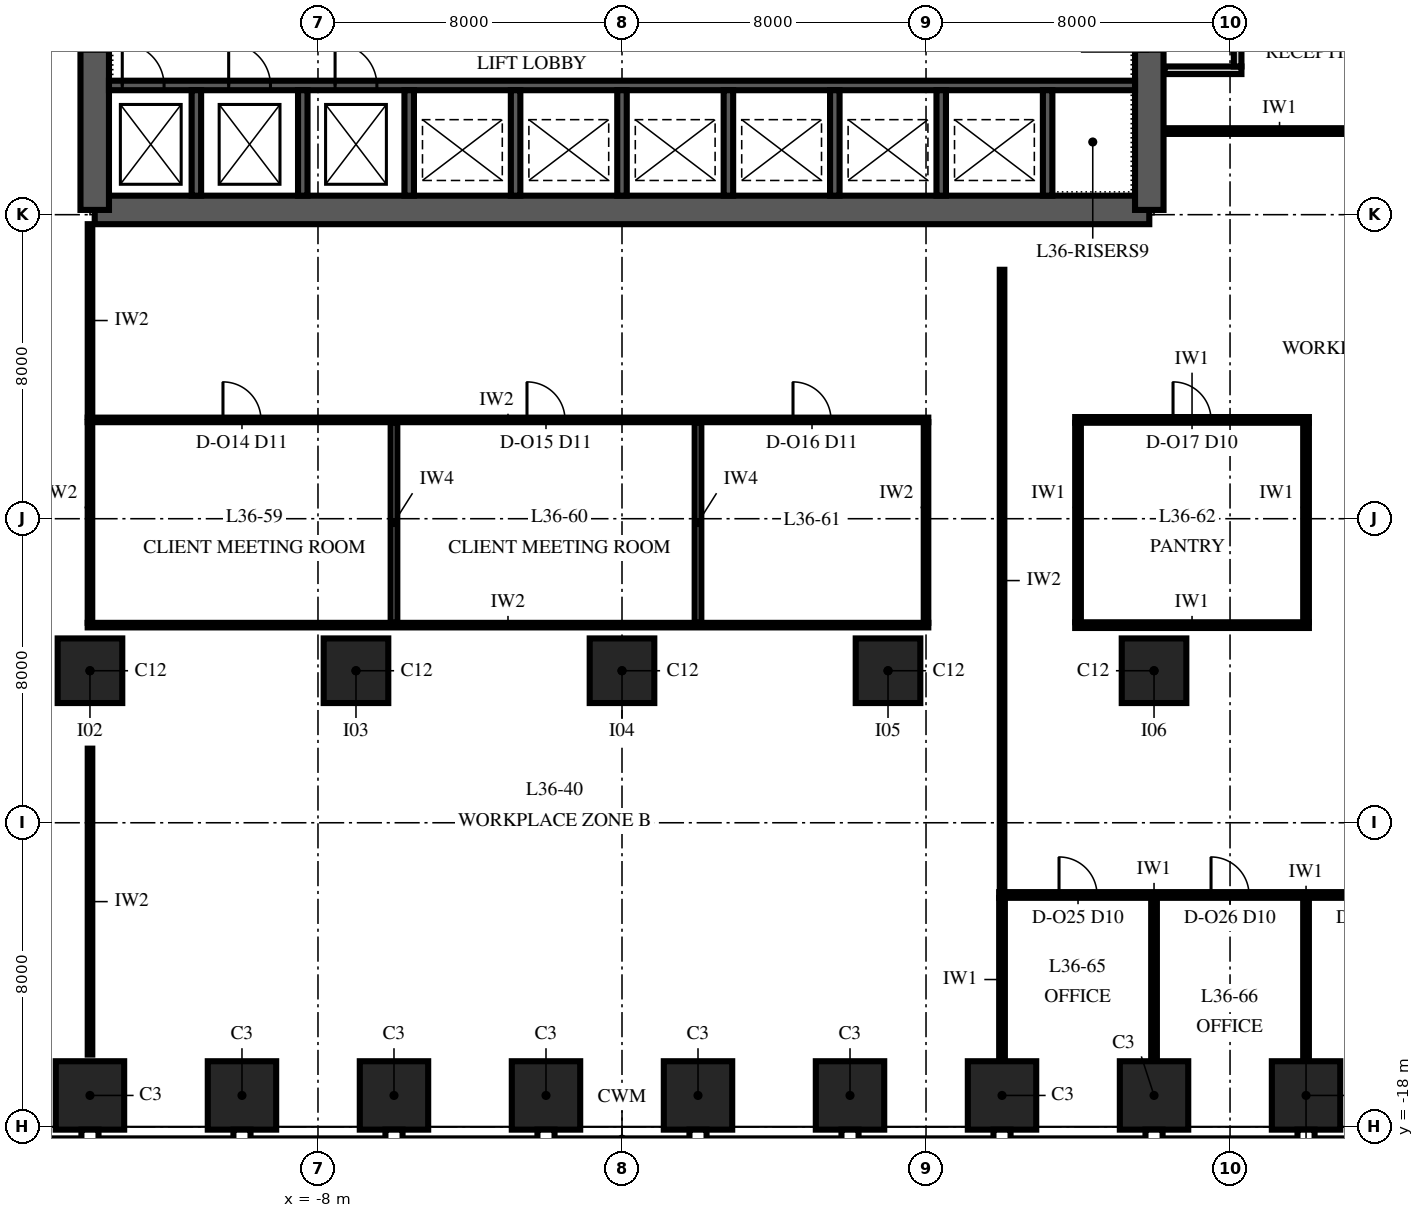
"""IFC4 building model, lengths in metres.
Left out: names, types, materials, properties, quantities, classifications, styles, units other than length and angle.
Written with IfcOpenShell. Run it as: python <this file> out.ifc"""

import sys

from ifc_helpers import new_model, si_unit, direction, frame, frame_2d, origin, origin_2d, place, context, subcontext, project, spatial, polyline, rectangle, outline, extrude, element, fill, save


model = new_model("IFC4")
c1 = context("Model", 3, precision=1e-05, world=origin(), true_north=direction((0.0, 1.0)))
c2 = subcontext(c1, "Body", "Model", "MODEL_VIEW")
j1 = project(units=[si_unit("LENGTHUNIT", "METRE"), si_unit("PLANEANGLEUNIT", "RADIAN")], contexts=[c1])
p1 = place(None, origin())
s1 = spatial("IfcSite", under=j1, at=p1, CompositionType="ELEMENT")
p2 = place(p1, origin())
s2 = spatial("IfcBuilding", under=s1, at=p2, CompositionType="ELEMENT")
p3 = place(p2, frame((0.0, 0.0, 159.0)))
s3 = spatial("IfcBuildingStorey", under=s2, at=p3, CompositionType="ELEMENT", Elevation=159.0)
for number, where, z_axis, x_axis in (
    (1, (-14.0, -17.175, 0.0), (0.0, 0.0, 1.0), (1.0, 0.0, 0.0)),
    (2, (-10.0, -17.175, 0.0), (0.0, 0.0, 1.0), (1.0, 0.0, 0.0)),
    (3, (-6.0, -17.175, 0.0), (0.0, 0.0, 1.0), (1.0, 0.0, 0.0)),
    (4, (-2.0, -17.175, 0.0), (0.0, 0.0, 1.0), (1.0, 0.0, 0.0)),
    (5, (2.0, -17.175, 0.0), (0.0, 0.0, 1.0), (1.0, 0.0, 0.0)),
    (6, (6.0, -17.175, 0.0), (0.0, 0.0, 1.0), (1.0, 0.0, 0.0)),
    (7, (10.0, -17.175, 0.0), (0.0, 0.0, 1.0), (1.0, 0.0, 0.0)),
    (8, (14.0, -17.175, 0.0), (0.0, 0.0, 1.0), (1.0, 0.0, 0.0)),
    (9, (18.0, -17.175, 0.0), (0.0, 0.0, 1.0), (1.0, 0.0, 0.0)),
):
    element("IfcColumn", number, at=place(p3, frame(where, z_axis=z_axis, x_axis=x_axis)), inside=s3, PredefinedType="COLUMN", context=c2, shape_type="SweptSolid", body=[
        extrude(rectangle(XDim=1.8, YDim=1.8, at=origin_2d()), origin(), (0.0, 0.0, 1.0), 4.0),
    ])
for number, where, z_axis, x_axis in (
    (10, (-14.0, -6.0, 0.0), (0.0, 0.0, 1.0), (1.0, 0.0, 0.0)),
    (11, (-7.0, -6.0, 0.0), (0.0, 0.0, 1.0), (1.0, 0.0, 0.0)),
    (12, (0.0, -6.0, 0.0), (0.0, 0.0, 1.0), (1.0, 0.0, 0.0)),
    (13, (7.0, -6.0, 0.0), (0.0, 0.0, 1.0), (1.0, 0.0, 0.0)),
    (14, (14.0, -6.0, 0.0), (0.0, 0.0, 1.0), (1.0, 0.0, 0.0)),
):
    element("IfcColumn", number, at=place(p3, frame(where, z_axis=z_axis, x_axis=x_axis)), inside=s3, PredefinedType="COLUMN", context=c2, shape_type="SweptSolid", body=[
        extrude(rectangle(XDim=1.7, YDim=1.7, at=origin_2d()), origin(), (0.0, 0.0, 1.0), 4.0),
    ])
p4 = place(p3, frame((-13.875, 6.125, 0.0), z_axis=(0.0, 0.0, 1.0), x_axis=(1.0, 0.0, 0.0)))
e15 = element("IfcWall", 15, at=p4, inside=s3, PredefinedType="SHEAR", context=c2, shape_type="SweptSolid", body=[
    extrude(rectangle(XDim=27.75, YDim=0.75, at=frame_2d((13.875, 0.0))), origin(), (0.0, 0.0, 1.0), 4.0),
])
p5 = place(p3, frame((13.875, 6.125, 0.0), z_axis=(0.0, 0.0, 1.0), x_axis=(0.0, 1.0, 0.0)))
e16 = element("IfcWall", 16, at=p5, inside=s3, PredefinedType="SHEAR", context=c2, shape_type="SweptSolid", body=[
    extrude(outline(polyline([(0.0, -0.375), (17.75, -0.375), (17.75, 0.0), (17.375, 0.0), (17.375, 0.375), (0.375, 0.375), (0.375, 0.0), (0.0, 0.0), (0.0, -0.375)])), origin(), (0.0, 0.0, 1.0), 4.0),
])
p6 = place(p5, frame((4.175, 0.0, 0.0)))
e17 = element("IfcOpeningElement", 17, at=p6, cuts=e16, PredefinedType="OPENING", context=c2, shape_type="SweptSolid", body=[
    extrude(rectangle(XDim=1.8, YDim=2.4, at=frame_2d((0.9, 1.2))), frame((0.0, 0.39, 0.0), z_axis=(0.0, -1.0, 0.0), x_axis=(1.0, 0.0, 0.0)), (0.0, 0.0, 1.0), 0.78),
])
p7 = place(p3, frame((-13.875, 23.875, 0.0), z_axis=(0.0, 0.0, 1.0), x_axis=(0.0, -1.0, 0.0)))
e18 = element("IfcWall", 18, at=p7, inside=s3, PredefinedType="SHEAR", context=c2, shape_type="SweptSolid", body=[
    extrude(outline(polyline([(0.0, -0.375), (17.75, -0.375), (17.75, 0.0), (17.375, 0.0), (17.375, 0.375), (0.375, 0.375), (0.375, 0.0), (0.0, 0.0), (0.0, -0.375)])), origin(), (0.0, 0.0, 1.0), 4.0),
])
p8 = place(p7, frame((11.775, 0.0, 0.0)))
e19 = element("IfcOpeningElement", 19, at=p8, cuts=e18, PredefinedType="OPENING", context=c2, shape_type="SweptSolid", body=[
    extrude(rectangle(XDim=1.8, YDim=2.4, at=frame_2d((0.9, 1.2))), frame((0.0, 0.39, 0.0), z_axis=(0.0, -1.0, 0.0), x_axis=(1.0, 0.0, 0.0)), (0.0, 0.0, 1.0), 0.78),
])
p9 = place(p3, frame((-13.5, 9.4, 0.0), z_axis=(0.0, 0.0, 1.0), x_axis=(1.0, 0.0, 0.0)))
e20 = element("IfcWall", 20, at=p9, inside=s3, PredefinedType="SHEAR", context=c2, shape_type="SweptSolid", body=[
    extrude(rectangle(XDim=27.0, YDim=0.25, at=frame_2d((13.5, 0.0))), origin(), (0.0, 0.0, 1.0), 4.0),
])
p10 = place(p9, frame((0.35, 0.0, 0.0)))
e21 = element("IfcOpeningElement", 21, at=p10, cuts=e20, PredefinedType="OPENING", context=c2, shape_type="SweptSolid", body=[
    extrude(rectangle(XDim=1.1, YDim=2.1, at=frame_2d((0.55, 1.05))), frame((0.0, 0.14, 0.0), z_axis=(0.0, -1.0, 0.0), x_axis=(1.0, 0.0, 0.0)), (0.0, 0.0, 1.0), 0.28),
])
p11 = place(p9, frame((3.15, 0.0, 0.0)))
e22 = element("IfcOpeningElement", 22, at=p11, cuts=e20, PredefinedType="OPENING", context=c2, shape_type="SweptSolid", body=[
    extrude(rectangle(XDim=1.1, YDim=2.1, at=frame_2d((0.55, 1.05))), frame((0.0, 0.14, 0.0), z_axis=(0.0, -1.0, 0.0), x_axis=(1.0, 0.0, 0.0)), (0.0, 0.0, 1.0), 0.28),
])
p12 = place(p9, frame((5.95, 0.0, 0.0)))
e23 = element("IfcOpeningElement", 23, at=p12, cuts=e20, PredefinedType="OPENING", context=c2, shape_type="SweptSolid", body=[
    extrude(rectangle(XDim=1.1, YDim=2.1, at=frame_2d((0.55, 1.05))), frame((0.0, 0.14, 0.0), z_axis=(0.0, -1.0, 0.0), x_axis=(1.0, 0.0, 0.0)), (0.0, 0.0, 1.0), 0.28),
])
for number, where, z_axis, x_axis in (
    (24, (-11.2, 6.5, 0.0), (0.0, 0.0, 1.0), (0.0, 1.0, 0.0)),
    (25, (-8.4, 6.5, 0.0), (0.0, 0.0, 1.0), (0.0, 1.0, 0.0)),
    (26, (-5.6, 6.5, 0.0), (0.0, 0.0, 1.0), (0.0, 1.0, 0.0)),
    (27, (-2.8, 6.5, 0.0), (0.0, 0.0, 1.0), (0.0, 1.0, 0.0)),
    (28, (0.0, 6.5, 0.0), (0.0, 0.0, 1.0), (0.0, 1.0, 0.0)),
    (29, (2.8, 6.5, 0.0), (0.0, 0.0, 1.0), (0.0, 1.0, 0.0)),
    (30, (5.6, 6.5, 0.0), (0.0, 0.0, 1.0), (0.0, 1.0, 0.0)),
    (31, (8.4, 6.5, 0.0), (0.0, 0.0, 1.0), (0.0, 1.0, 0.0)),
    (32, (11.2, 6.5, 0.0), (0.0, 0.0, 1.0), (0.0, 1.0, 0.0)),
):
    element("IfcWall", number, at=place(p3, frame(where, z_axis=z_axis, x_axis=x_axis)), inside=s3, PredefinedType="SHEAR", context=c2, shape_type="SweptSolid", body=[
        extrude(rectangle(XDim=2.775, YDim=0.25, at=frame_2d((1.387, 0.0))), origin(), (0.0, 0.0, 1.0), 4.0),
    ])
p13 = place(p3, frame((9.925, -11.9, 0.0), z_axis=(0.0, 0.0, 1.0), x_axis=(1.0, 0.0, 0.0)))
e33 = element("IfcWall", 33, at=p13, inside=s3, PredefinedType="PARTITIONING", context=c2, shape_type="SweptSolid", body=[
    extrude(rectangle(XDim=16.15, YDim=0.15, at=frame_2d((8.075, 0.0))), origin(), (0.0, 0.0, 1.0), 3.25),
])
p14 = place(p13, frame((1.575, 0.0, 0.0)))
e34 = element("IfcOpeningElement", 34, at=p14, cuts=e33, PredefinedType="OPENING", context=c2, shape_type="SweptSolid", body=[
    extrude(rectangle(XDim=1.0, YDim=2.3, at=frame_2d((0.5, 1.15))), frame((0.0, 0.09, 0.0), z_axis=(0.0, -1.0, 0.0), x_axis=(1.0, 0.0, 0.0)), (0.0, 0.0, 1.0), 0.18),
])
p15 = place(p13, frame((5.575, 0.0, 0.0)))
e35 = element("IfcOpeningElement", 35, at=p15, cuts=e33, PredefinedType="OPENING", context=c2, shape_type="SweptSolid", body=[
    extrude(rectangle(XDim=1.0, YDim=2.3, at=frame_2d((0.5, 1.15))), frame((0.0, 0.09, 0.0), z_axis=(0.0, -1.0, 0.0), x_axis=(1.0, 0.0, 0.0)), (0.0, 0.0, 1.0), 0.18),
])
p16 = place(p13, frame((9.575, 0.0, 0.0)))
e36 = element("IfcOpeningElement", 36, at=p16, cuts=e33, PredefinedType="OPENING", context=c2, shape_type="SweptSolid", body=[
    extrude(rectangle(XDim=1.0, YDim=2.3, at=frame_2d((0.5, 1.15))), frame((0.0, 0.09, 0.0), z_axis=(0.0, -1.0, 0.0), x_axis=(1.0, 0.0, 0.0)), (0.0, 0.0, 1.0), 0.18),
])
p17 = place(p13, frame((13.575, 0.0, 0.0)))
e37 = element("IfcOpeningElement", 37, at=p17, cuts=e33, PredefinedType="OPENING", context=c2, shape_type="SweptSolid", body=[
    extrude(rectangle(XDim=1.0, YDim=2.3, at=frame_2d((0.5, 1.15))), frame((0.0, 0.09, 0.0), z_axis=(0.0, -1.0, 0.0), x_axis=(1.0, 0.0, 0.0)), (0.0, 0.0, 1.0), 0.18),
])
p18 = place(p3, frame((-14.06, -4.8, 0.0), z_axis=(0.0, 0.0, 1.0), x_axis=(1.0, 0.0, 0.0)))
e38 = element("IfcWall", 38, at=p18, inside=s3, PredefinedType="PARTITIONING", context=c2, shape_type="SweptSolid", body=[
    extrude(rectangle(XDim=22.12, YDim=0.12, at=frame_2d((11.06, 0.0))), origin(), (0.0, 0.0, 1.0), 3.25),
])
p19 = place(p3, frame((11.925, -4.8, 0.0), z_axis=(0.0, 0.0, 1.0), x_axis=(1.0, 0.0, 0.0)))
e39 = element("IfcWall", 39, at=p19, inside=s3, PredefinedType="PARTITIONING", context=c2, shape_type="SweptSolid", body=[
    extrude(rectangle(XDim=6.15, YDim=0.15, at=frame_2d((3.075, 0.0))), origin(), (0.0, 0.0, 1.0), 3.25),
])
p20 = place(p3, frame((-14.06, 0.6, 0.0), z_axis=(0.0, 0.0, 1.0), x_axis=(1.0, 0.0, 0.0)))
e40 = element("IfcWall", 40, at=p20, inside=s3, PredefinedType="PARTITIONING", context=c2, shape_type="SweptSolid", body=[
    extrude(rectangle(XDim=22.12, YDim=0.12, at=frame_2d((11.06, 0.0))), origin(), (0.0, 0.0, 1.0), 3.25),
])
p21 = place(p20, frame((3.56, 0.0, 0.0)))
e41 = element("IfcOpeningElement", 41, at=p21, cuts=e40, PredefinedType="OPENING", context=c2, shape_type="SweptSolid", body=[
    extrude(rectangle(XDim=1.0, YDim=2.4, at=frame_2d((0.5, 1.2))), frame((0.0, 0.075, 0.0), z_axis=(0.0, -1.0, 0.0), x_axis=(1.0, 0.0, 0.0)), (0.0, 0.0, 1.0), 0.15),
])
p22 = place(p20, frame((11.56, 0.0, 0.0)))
e42 = element("IfcOpeningElement", 42, at=p22, cuts=e40, PredefinedType="OPENING", context=c2, shape_type="SweptSolid", body=[
    extrude(rectangle(XDim=1.0, YDim=2.4, at=frame_2d((0.5, 1.2))), frame((0.0, 0.075, 0.0), z_axis=(0.0, -1.0, 0.0), x_axis=(1.0, 0.0, 0.0)), (0.0, 0.0, 1.0), 0.15),
])
p23 = place(p20, frame((18.56, 0.0, 0.0)))
e43 = element("IfcOpeningElement", 43, at=p23, cuts=e40, PredefinedType="OPENING", context=c2, shape_type="SweptSolid", body=[
    extrude(rectangle(XDim=1.0, YDim=2.4, at=frame_2d((0.5, 1.2))), frame((0.0, 0.075, 0.0), z_axis=(0.0, -1.0, 0.0), x_axis=(1.0, 0.0, 0.0)), (0.0, 0.0, 1.0), 0.15),
])
p24 = place(p3, frame((11.925, 0.6, 0.0), z_axis=(0.0, 0.0, 1.0), x_axis=(1.0, 0.0, 0.0)))
e44 = element("IfcWall", 44, at=p24, inside=s3, PredefinedType="PARTITIONING", context=c2, shape_type="SweptSolid", body=[
    extrude(rectangle(XDim=6.15, YDim=0.15, at=frame_2d((3.075, 0.0))), origin(), (0.0, 0.0, 1.0), 3.25),
])
p25 = place(p24, frame((2.575, 0.0, 0.0)))
e45 = element("IfcOpeningElement", 45, at=p25, cuts=e44, PredefinedType="OPENING", context=c2, shape_type="SweptSolid", body=[
    extrude(rectangle(XDim=1.0, YDim=2.3, at=frame_2d((0.5, 1.15))), frame((0.0, 0.09, 0.0), z_axis=(0.0, -1.0, 0.0), x_axis=(1.0, 0.0, 0.0)), (0.0, 0.0, 1.0), 0.18),
])
p26 = place(p3, frame((14.28, 8.2, 0.0), z_axis=(0.0, 0.0, 1.0), x_axis=(1.0, 0.0, 0.0)))
e46 = element("IfcWall", 46, at=p26, inside=s3, PredefinedType="PARTITIONING", context=c2, shape_type="SweptSolid", body=[
    extrude(rectangle(XDim=6.045, YDim=0.15, at=frame_2d((3.022, 0.0))), origin(), (0.0, 0.0, 1.0), 3.85),
])
p27 = place(p3, frame((14.28, 9.8, 0.0), z_axis=(0.0, 0.0, 1.0), x_axis=(1.0, 0.0, 0.0)))
e47 = element("IfcWall", 47, at=p27, inside=s3, PredefinedType="PARTITIONING", context=c2, shape_type="SweptSolid", body=[
    extrude(rectangle(XDim=2.02, YDim=0.2, at=frame_2d((1.01, 0.0))), origin(), (0.0, 0.0, 1.0), 3.85),
])
p28 = place(p3, frame((-14.0, -4.74, 0.0), z_axis=(0.0, 0.0, 1.0), x_axis=(0.0, 1.0, 0.0)))
e48 = element("IfcWall", 48, at=p28, inside=s3, PredefinedType="PARTITIONING", context=c2, shape_type="SweptSolid", body=[
    extrude(rectangle(XDim=5.28, YDim=0.12, at=frame_2d((2.64, 0.0))), origin(), (0.0, 0.0, 1.0), 3.25),
])
for number, where, z_axis, x_axis in (
    (49, (-6.0, -4.74, 0.0), (0.0, 0.0, 1.0), (0.0, 1.0, 0.0)),
    (50, (2.0, -4.74, 0.0), (0.0, 0.0, 1.0), (0.0, 1.0, 0.0)),
):
    element("IfcWall", number, at=place(p3, frame(where, z_axis=z_axis, x_axis=x_axis)), inside=s3, PredefinedType="PARTITIONING", context=c2, shape_type="SweptSolid", body=[
        extrude(rectangle(XDim=5.28, YDim=0.175, at=frame_2d((2.64, 0.0))), origin(), (0.0, 0.0, 1.0), 3.25),
    ])
p29 = place(p3, frame((8.0, -4.74, 0.0), z_axis=(0.0, 0.0, 1.0), x_axis=(0.0, 1.0, 0.0)))
e51 = element("IfcWall", 51, at=p29, inside=s3, PredefinedType="PARTITIONING", context=c2, shape_type="SweptSolid", body=[
    extrude(rectangle(XDim=5.28, YDim=0.12, at=frame_2d((2.64, 0.0))), origin(), (0.0, 0.0, 1.0), 3.85),
])
p30 = place(p3, frame((10.0, -16.275, 0.0), z_axis=(0.0, 0.0, 1.0), x_axis=(0.0, 1.0, 0.0)))
e52 = element("IfcWall", 52, at=p30, inside=s3, PredefinedType="PARTITIONING", context=c2, shape_type="SweptSolid", body=[
    extrude(rectangle(XDim=4.3, YDim=0.15, at=frame_2d((2.15, 0.0))), origin(), (0.0, 0.0, 1.0), 3.25),
])
p31 = place(p3, frame((12.0, -4.725, 0.0), z_axis=(0.0, 0.0, 1.0), x_axis=(0.0, 1.0, 0.0)))
e53 = element("IfcWall", 53, at=p31, inside=s3, PredefinedType="PARTITIONING", context=c2, shape_type="SweptSolid", body=[
    extrude(rectangle(XDim=5.25, YDim=0.15, at=frame_2d((2.625, 0.0))), origin(), (0.0, 0.0, 1.0), 3.85),
])
p32 = place(p3, frame((14.0, -16.275, 0.0), z_axis=(0.0, 0.0, 1.0), x_axis=(0.0, 1.0, 0.0)))
e54 = element("IfcWall", 54, at=p32, inside=s3, PredefinedType="PARTITIONING", context=c2, shape_type="SweptSolid", body=[
    extrude(rectangle(XDim=4.3, YDim=0.15, at=frame_2d((2.15, 0.0))), origin(), (0.0, 0.0, 1.0), 3.25),
])
p33 = place(p3, frame((16.2, 9.9, 0.0), z_axis=(0.0, 0.0, 1.0), x_axis=(0.0, 1.0, 0.0)))
e55 = element("IfcWall", 55, at=p33, inside=s3, PredefinedType="PARTITIONING", context=c2, shape_type="SweptSolid", body=[
    extrude(rectangle(XDim=16.2, YDim=0.2, at=frame_2d((8.1, 0.0))), origin(), (0.0, 0.0, 1.0), 3.25),
])
p34 = place(p33, frame((14.7, 0.0, 0.0)))
e56 = element("IfcOpeningElement", 56, at=p34, cuts=e55, PredefinedType="OPENING", context=c2, shape_type="SweptSolid", body=[
    extrude(rectangle(XDim=1.2, YDim=2.4, at=frame_2d((0.6, 1.2))), frame((0.0, 0.115, 0.0), z_axis=(0.0, -1.0, 0.0), x_axis=(1.0, 0.0, 0.0)), (0.0, 0.0, 1.0), 0.23),
])
p35 = place(p3, frame((18.0, -16.275, 0.0), z_axis=(0.0, 0.0, 1.0), x_axis=(0.0, 1.0, 0.0)))
e57 = element("IfcWall", 57, at=p35, inside=s3, PredefinedType="PARTITIONING", context=c2, shape_type="SweptSolid", body=[
    extrude(rectangle(XDim=4.3, YDim=0.15, at=frame_2d((2.15, 0.0))), origin(), (0.0, 0.0, 1.0), 3.25),
])
p36 = place(p3, frame((18.0, -4.725, 0.0), z_axis=(0.0, 0.0, 1.0), x_axis=(0.0, 1.0, 0.0)))
e58 = element("IfcWall", 58, at=p36, inside=s3, PredefinedType="PARTITIONING", context=c2, shape_type="SweptSolid", body=[
    extrude(rectangle(XDim=5.25, YDim=0.15, at=frame_2d((2.625, 0.0))), origin(), (0.0, 0.0, 1.0), 3.25),
])
p37 = place(p3, frame((-13.999, -16.1, 0.0), z_axis=(0.0, 0.0, 1.0), x_axis=(0.0, 1.0, 0.0)))
e59 = element("IfcWall", 59, at=p37, inside=s3, PredefinedType="PARTITIONING", context=c2, shape_type="SweptSolid", body=[
    extrude(rectangle(XDim=8.05, YDim=0.12, at=frame_2d((4.025, 0.0))), origin(), (0.0, 0.0, 1.0), 3.25),
])
p38 = place(p3, frame((-13.999, 0.68, 0.0), z_axis=(0.0, 0.0, 1.0), x_axis=(0.0, 1.0, 0.0)))
e60 = element("IfcWall", 60, at=p38, inside=s3, PredefinedType="PARTITIONING", context=c2, shape_type="SweptSolid", body=[
    extrude(rectangle(XDim=5.07, YDim=0.12, at=frame_2d((2.535, 0.0))), origin(), (0.0, 0.0, 1.0), 3.25),
])
p39 = place(p3, frame((10.001, -11.805, 0.0), z_axis=(0.0, 0.0, 1.0), x_axis=(0.0, 1.0, 0.0)))
e61 = element("IfcWall", 61, at=p39, inside=s3, PredefinedType="PARTITIONING", context=c2, shape_type="SweptSolid", body=[
    extrude(rectangle(XDim=16.355, YDim=0.12, at=frame_2d((8.177, 0.0))), origin(), (0.0, 0.0, 1.0), 2.842),
])
p40 = place(p10, origin())
e62 = element("IfcDoor", 62, at=p40, inside=s3, OperationType="SLIDING_TO_LEFT", PredefinedType="DOOR", context=c2, shape_type="SweptSolid", body=[
    extrude(rectangle(XDim=1.1, YDim=2.1, at=frame_2d((0.55, 1.05))), frame((0.0, 0.125, 0.0), z_axis=(0.0, -1.0, 0.0), x_axis=(1.0, 0.0, 0.0)), (0.0, 0.0, 1.0), 0.25),
])
fill(e21, e62)
p41 = place(p11, origin())
e63 = element("IfcDoor", 63, at=p41, inside=s3, OperationType="SLIDING_TO_LEFT", PredefinedType="DOOR", context=c2, shape_type="SweptSolid", body=[
    extrude(rectangle(XDim=1.1, YDim=2.1, at=frame_2d((0.55, 1.05))), frame((0.0, 0.125, 0.0), z_axis=(0.0, -1.0, 0.0), x_axis=(1.0, 0.0, 0.0)), (0.0, 0.0, 1.0), 0.25),
])
fill(e22, e63)
p42 = place(p12, origin())
e64 = element("IfcDoor", 64, at=p42, inside=s3, OperationType="SLIDING_TO_LEFT", PredefinedType="DOOR", context=c2, shape_type="SweptSolid", body=[
    extrude(rectangle(XDim=1.1, YDim=2.1, at=frame_2d((0.55, 1.05))), frame((0.0, 0.125, 0.0), z_axis=(0.0, -1.0, 0.0), x_axis=(1.0, 0.0, 0.0)), (0.0, 0.0, 1.0), 0.25),
])
fill(e23, e64)
p43 = place(p21, origin())
e65 = element("IfcDoor", 65, at=p43, inside=s3, OperationType="SINGLE_SWING_RIGHT", PredefinedType="DOOR", context=c2, shape_type="SweptSolid", body=[
    extrude(rectangle(XDim=1.0, YDim=2.4, at=frame_2d((0.5, 1.2))), frame((0.0, 0.06, 0.0), z_axis=(0.0, -1.0, 0.0), x_axis=(1.0, 0.0, 0.0)), (0.0, 0.0, 1.0), 0.12),
])
fill(e41, e65)
p44 = place(p22, origin())
e66 = element("IfcDoor", 66, at=p44, inside=s3, OperationType="SINGLE_SWING_RIGHT", PredefinedType="DOOR", context=c2, shape_type="SweptSolid", body=[
    extrude(rectangle(XDim=1.0, YDim=2.4, at=frame_2d((0.5, 1.2))), frame((0.0, 0.06, 0.0), z_axis=(0.0, -1.0, 0.0), x_axis=(1.0, 0.0, 0.0)), (0.0, 0.0, 1.0), 0.12),
])
fill(e42, e66)
p45 = place(p23, origin())
e67 = element("IfcDoor", 67, at=p45, inside=s3, OperationType="SINGLE_SWING_RIGHT", PredefinedType="DOOR", context=c2, shape_type="SweptSolid", body=[
    extrude(rectangle(XDim=1.0, YDim=2.4, at=frame_2d((0.5, 1.2))), frame((0.0, 0.06, 0.0), z_axis=(0.0, -1.0, 0.0), x_axis=(1.0, 0.0, 0.0)), (0.0, 0.0, 1.0), 0.12),
])
fill(e43, e67)
p46 = place(p25, origin())
e68 = element("IfcDoor", 68, at=p46, inside=s3, OperationType="SINGLE_SWING_LEFT", PredefinedType="DOOR", context=c2, shape_type="SweptSolid", body=[
    extrude(rectangle(XDim=1.0, YDim=2.3, at=frame_2d((0.5, 1.15))), frame((0.0, 0.075, 0.0), z_axis=(0.0, -1.0, 0.0), x_axis=(1.0, 0.0, 0.0)), (0.0, 0.0, 1.0), 0.149),
])
fill(e45, e68)
p47 = place(p14, origin())
e69 = element("IfcDoor", 69, at=p47, inside=s3, OperationType="SINGLE_SWING_LEFT", PredefinedType="DOOR", context=c2, shape_type="SweptSolid", body=[
    extrude(rectangle(XDim=1.0, YDim=2.3, at=frame_2d((0.5, 1.15))), frame((0.0, 0.075, 0.0), z_axis=(0.0, -1.0, 0.0), x_axis=(1.0, 0.0, 0.0)), (0.0, 0.0, 1.0), 0.149),
])
fill(e34, e69)
p48 = place(p15, origin())
e70 = element("IfcDoor", 70, at=p48, inside=s3, OperationType="SINGLE_SWING_LEFT", PredefinedType="DOOR", context=c2, shape_type="SweptSolid", body=[
    extrude(rectangle(XDim=1.0, YDim=2.3, at=frame_2d((0.5, 1.15))), frame((0.0, 0.075, 0.0), z_axis=(0.0, -1.0, 0.0), x_axis=(1.0, 0.0, 0.0)), (0.0, 0.0, 1.0), 0.149),
])
fill(e35, e70)
save(model, sys.argv[1])
